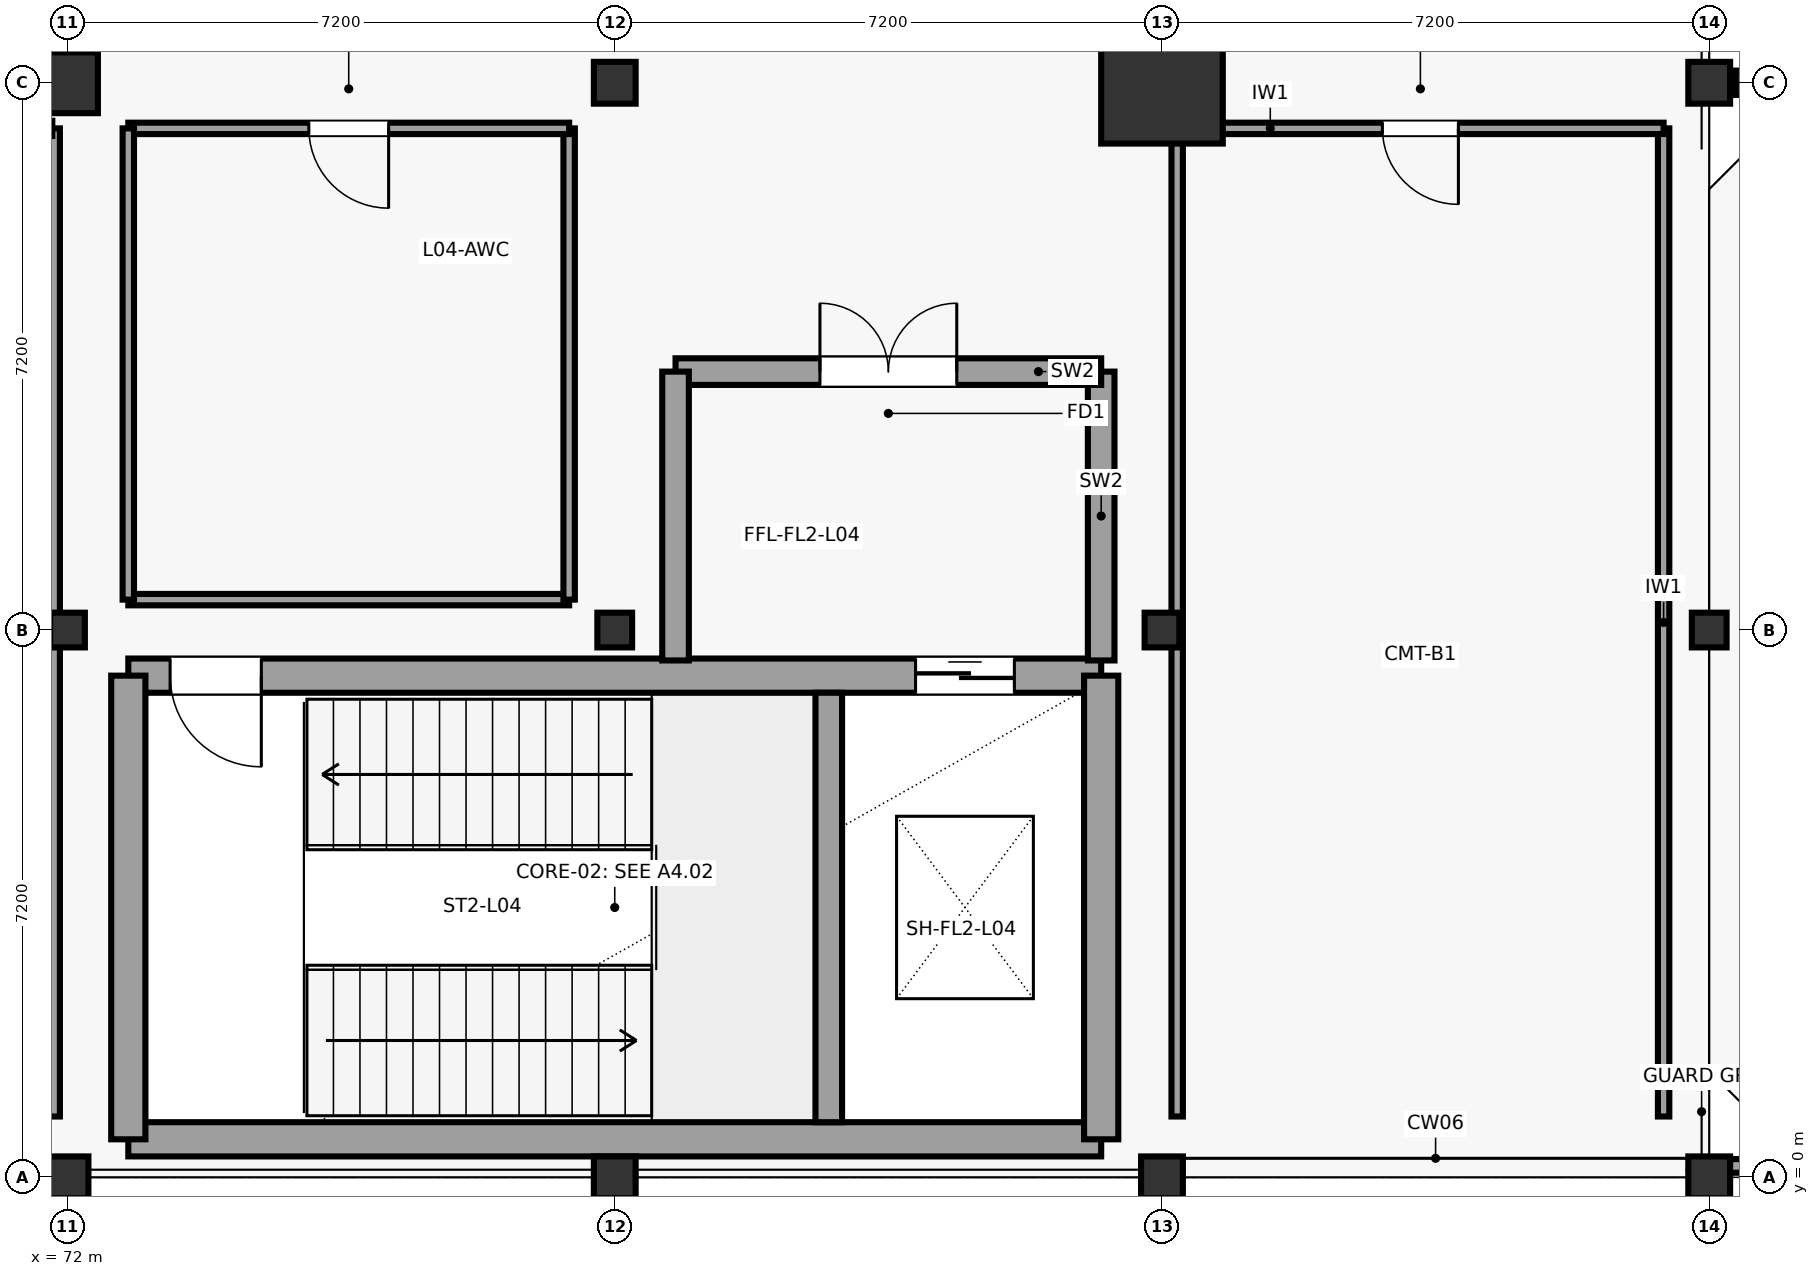
"""IFC4 building model, lengths in metres.
Left out: names, types, materials, properties, quantities, classifications, styles, units other than length and angle.
Written with IfcOpenShell. Run it as: python <this file> out.ifc"""

import sys

from ifc_helpers import new_model, si_unit, direction, frame, frame_2d, origin, origin_2d, place, context, subcontext, project, spatial, rectangle, circle, hollow_circle, extrude, element, fill, save


model = new_model("IFC4")
c1 = context("Model", 3, precision=1e-05, world=origin(), true_north=direction((0.0, 1.0)))
c2 = subcontext(c1, "Body", "Model", "MODEL_VIEW")
j1 = project(units=[si_unit("LENGTHUNIT", "METRE"), si_unit("PLANEANGLEUNIT", "RADIAN")], contexts=[c1])
p1 = place(None, origin())
s1 = spatial("IfcSite", under=j1, at=p1, CompositionType="ELEMENT")
p2 = place(p1, origin())
s2 = spatial("IfcBuilding", under=s1, at=p2, CompositionType="ELEMENT")
p3 = place(p2, frame((0.0, 0.0, 18.6)))
s3 = spatial("IfcBuildingStorey", under=s2, at=p3, CompositionType="ELEMENT", Elevation=18.6)
p4 = place(p3, frame((72.0, 0.0, 0.0), z_axis=(0.0, 0.0, 1.0), x_axis=(1.0, 0.0, 0.0)))
e1 = element("IfcColumn", 1, at=p4, inside=s3, PredefinedType="COLUMN", context=c2, shape_type="SweptSolid", body=[
    extrude(rectangle(XDim=0.55, YDim=0.55, at=origin_2d()), origin(), (0.0, 0.0, 1.0), 4.4),
])
p5 = place(p3, frame((72.0, 7.2, 0.0), z_axis=(0.0, 0.0, 1.0), x_axis=(1.0, 0.0, 0.0)))
e2 = element("IfcColumn", 2, at=p5, inside=s3, PredefinedType="COLUMN", context=c2, shape_type="SweptSolid", body=[
    extrude(hollow_circle(Radius=0.229, WallThickness=0.02, at=origin_2d()), origin(), (0.0, 0.0, 1.0), 4.4),
])
p6 = place(p3, frame((72.0, 14.4, 0.0), z_axis=(0.0, 0.0, 1.0), x_axis=(1.0, 0.0, 0.0)))
e3 = element("IfcColumn", 3, at=p6, inside=s3, PredefinedType="COLUMN", context=c2, shape_type="SweptSolid", body=[
    extrude(circle(Radius=0.4, at=origin_2d()), origin(), (0.0, 0.0, 1.0), 4.4),
])
p7 = place(p3, frame((79.2, 0.0, 0.0), z_axis=(0.0, 0.0, 1.0), x_axis=(1.0, 0.0, 0.0)))
e4 = element("IfcColumn", 4, at=p7, inside=s3, PredefinedType="COLUMN", context=c2, shape_type="SweptSolid", body=[
    extrude(rectangle(XDim=0.55, YDim=0.55, at=origin_2d()), origin(), (0.0, 0.0, 1.0), 4.4),
])
p8 = place(p3, frame((79.2, 7.2, 0.0), z_axis=(0.0, 0.0, 1.0), x_axis=(1.0, 0.0, 0.0)))
e5 = element("IfcColumn", 5, at=p8, inside=s3, PredefinedType="COLUMN", context=c2, shape_type="SweptSolid", body=[
    extrude(hollow_circle(Radius=0.229, WallThickness=0.02, at=origin_2d()), origin(), (0.0, 0.0, 1.0), 4.4),
])
for number, where, z_axis, x_axis in (
    (6, (79.2, 14.4, 0.0), (0.0, 0.0, 1.0), (1.0, 0.0, 0.0)),
    (7, (86.4, 0.0, 0.0), (0.0, 0.0, 1.0), (1.0, 0.0, 0.0)),
):
    element("IfcColumn", number, at=place(p3, frame(where, z_axis=z_axis, x_axis=x_axis)), inside=s3, PredefinedType="COLUMN", context=c2, shape_type="SweptSolid", body=[
        extrude(rectangle(XDim=0.55, YDim=0.55, at=origin_2d()), origin(), (0.0, 0.0, 1.0), 4.4),
    ])
p9 = place(p3, frame((86.4, 7.2, 0.0), z_axis=(0.0, 0.0, 1.0), x_axis=(1.0, 0.0, 0.0)))
e8 = element("IfcColumn", 8, at=p9, inside=s3, PredefinedType="COLUMN", context=c2, shape_type="SweptSolid", body=[
    extrude(hollow_circle(Radius=0.229, WallThickness=0.02, at=origin_2d()), origin(), (0.0, 0.0, 1.0), 4.4),
])
p10 = place(p3, frame((86.4, 14.4, 0.0), z_axis=(0.0, 0.0, 1.0), x_axis=(1.0, 0.0, 0.0)))
e9 = element("IfcColumn", 9, at=p10, inside=s3, PredefinedType="COLUMN", context=c2, shape_type="SweptSolid", body=[
    extrude(circle(Radius=0.8, at=origin_2d()), origin(), (0.0, 0.0, 1.0), 4.4),
])
p11 = place(p3, frame((93.6, 0.0, 0.0), z_axis=(0.0, 0.0, 1.0), x_axis=(1.0, 0.0, 0.0)))
e10 = element("IfcColumn", 10, at=p11, inside=s3, PredefinedType="COLUMN", context=c2, shape_type="SweptSolid", body=[
    extrude(rectangle(XDim=0.55, YDim=0.55, at=origin_2d()), origin(), (0.0, 0.0, 1.0), 4.4),
])
p12 = place(p3, frame((93.6, 7.2, 0.0), z_axis=(0.0, 0.0, 1.0), x_axis=(1.0, 0.0, 0.0)))
e11 = element("IfcColumn", 11, at=p12, inside=s3, PredefinedType="COLUMN", context=c2, shape_type="SweptSolid", body=[
    extrude(hollow_circle(Radius=0.229, WallThickness=0.02, at=origin_2d()), origin(), (0.0, 0.0, 1.0), 4.4),
])
p13 = place(p3, frame((93.6, 14.4, 0.0), z_axis=(0.0, 0.0, 1.0), x_axis=(1.0, 0.0, 0.0)))
e12 = element("IfcColumn", 12, at=p13, inside=s3, PredefinedType="COLUMN", context=c2, shape_type="SweptSolid", body=[
    extrude(rectangle(XDim=0.55, YDim=0.55, at=origin_2d()), origin(), (0.0, 0.0, 1.0), 4.4),
])
p14 = place(p3, frame((72.8, 0.5, 0.0), z_axis=(0.0, 0.0, 1.0), x_axis=(1.0, 0.0, 0.0)))
e13 = element("IfcWall", 13, at=p14, inside=s3, PredefinedType="SHEAR", context=c2, shape_type="SweptSolid", body=[
    extrude(rectangle(XDim=12.8, YDim=0.45, at=frame_2d((6.4, 0.0))), origin(), (0.0, 0.0, 1.0), 4.15),
])
p15 = place(p3, frame((72.8, 6.6, 0.0), z_axis=(0.0, 0.0, 1.0), x_axis=(1.0, 0.0, 0.0)))
e14 = element("IfcWall", 14, at=p15, inside=s3, PredefinedType="SHEAR", context=c2, shape_type="SweptSolid", body=[
    extrude(rectangle(XDim=12.8, YDim=0.45, at=frame_2d((6.4, 0.0))), origin(), (0.0, 0.0, 1.0), 4.15),
])
p16 = place(p15, frame((0.55, 0.0, 0.0)))
e15 = element("IfcOpeningElement", 15, at=p16, cuts=e14, PredefinedType="OPENING", context=c2, shape_type="SweptSolid", body=[
    extrude(rectangle(XDim=1.2, YDim=2.25, at=frame_2d((0.6, 1.125))), frame((0.0, 0.235, 0.0), z_axis=(0.0, -1.0, 0.0), x_axis=(1.0, 0.0, 0.0)), (0.0, 0.0, 1.0), 0.47),
])
p17 = place(p15, frame((10.358, 0.0, 0.0)))
e16 = element("IfcOpeningElement", 16, at=p17, cuts=e14, PredefinedType="OPENING", context=c2, shape_type="SweptSolid", body=[
    extrude(rectangle(XDim=1.3, YDim=2.25, at=frame_2d((0.65, 1.125))), frame((0.0, 0.235, 0.0), z_axis=(0.0, -1.0, 0.0), x_axis=(1.0, 0.0, 0.0)), (0.0, 0.0, 1.0), 0.47),
])
for number, where, z_axis, x_axis in (
    (17, (72.8, 0.5, 0.0), (0.0, 0.0, 1.0), (0.0, 1.0, 0.0)),
    (18, (85.6, 0.5, 0.0), (0.0, 0.0, 1.0), (0.0, 1.0, 0.0)),
):
    element("IfcWall", number, at=place(p3, frame(where, z_axis=z_axis, x_axis=x_axis)), inside=s3, PredefinedType="SHEAR", context=c2, shape_type="SweptSolid", body=[
        extrude(rectangle(XDim=6.1, YDim=0.45, at=frame_2d((3.05, 0.0))), origin(), (0.0, 0.0, 1.0), 4.15),
    ])
p18 = place(p3, frame((82.016, 0.725, 0.0), z_axis=(0.0, 0.0, 1.0), x_axis=(0.0, 1.0, 0.0)))
e19 = element("IfcWall", 19, at=p18, inside=s3, PredefinedType="SHEAR", context=c2, shape_type="SweptSolid", body=[
    extrude(rectangle(XDim=5.65, YDim=0.35, at=frame_2d((2.825, 0.0))), origin(), (0.0, 0.0, 1.0), 4.15),
])
p19 = place(p3, frame((93.95, 14.4, 0.0), z_axis=(0.0, 0.0, 1.0), x_axis=(1.0, 0.0, 0.0)))
e20 = element("IfcWall", 20, at=p19, inside=s3, PredefinedType="SOLIDWALL", context=c2, shape_type="SweptSolid", body=[
    extrude(rectangle(XDim=13.7, YDim=0.32, at=frame_2d((6.85, 0.0))), origin(), (0.0, 0.0, 1.0), 3.21),
])
p20 = place(p3, frame((93.75, 0.15, 0.0), z_axis=(0.0, 0.0, 1.0), x_axis=(1.0, 0.0, 0.0)))
e21 = element("IfcWall", 21, at=p20, inside=s3, PredefinedType="PARAPET", context=c2, shape_type="SweptSolid", body=[
    extrude(rectangle(XDim=28.5, YDim=0.18, at=frame_2d((14.25, 0.0))), origin(), (0.0, 0.0, 1.0), 1.15),
])
p21 = place(p3, frame((85.6, 6.8, 0.0), z_axis=(0.0, 0.0, 1.0), x_axis=(0.0, 1.0, 0.0)))
e22 = element("IfcWall", 22, at=p21, inside=s3, PredefinedType="SHEAR", context=c2, shape_type="SweptSolid", body=[
    extrude(rectangle(XDim=3.8, YDim=0.35, at=frame_2d((1.9, 0.0))), origin(), (0.0, 0.0, 1.0), 3.21),
])
p22 = place(p3, frame((85.6, 10.6, 0.0), z_axis=(0.0, 0.0, 1.0), x_axis=(-1.0, 0.0, 0.0)))
e23 = element("IfcWall", 23, at=p22, inside=s3, PredefinedType="SHEAR", context=c2, shape_type="SweptSolid", body=[
    extrude(rectangle(XDim=5.6, YDim=0.35, at=frame_2d((2.8, 0.0))), origin(), (0.0, 0.0, 1.0), 3.21),
])
p23 = place(p22, frame((1.9, 0.0, 0.0)))
e24 = element("IfcOpeningElement", 24, at=p23, cuts=e23, PredefinedType="OPENING", context=c2, shape_type="SweptSolid", body=[
    extrude(rectangle(XDim=1.8, YDim=2.3, at=frame_2d((0.9, 1.15))), frame((0.0, 0.185, 0.0), z_axis=(0.0, -1.0, 0.0), x_axis=(1.0, 0.0, 0.0)), (0.0, 0.0, 1.0), 0.37),
])
p24 = place(p3, frame((80.0, 10.6, 0.0), z_axis=(0.0, 0.0, 1.0), x_axis=(0.0, -1.0, 0.0)))
e25 = element("IfcWall", 25, at=p24, inside=s3, PredefinedType="SHEAR", context=c2, shape_type="SweptSolid", body=[
    extrude(rectangle(XDim=3.8, YDim=0.35, at=frame_2d((1.9, 0.0))), origin(), (0.0, 0.0, 1.0), 3.21),
])
p25 = place(p3, frame((71.8, 0.8, 0.0), z_axis=(0.0, 0.0, 1.0), x_axis=(0.0, 1.0, 0.0)))
e26 = element("IfcWall", 26, at=p25, inside=s3, PredefinedType="PARTITIONING", context=c2, shape_type="SweptSolid", body=[
    extrude(rectangle(XDim=13.0, YDim=0.2, at=frame_2d((6.5, 0.0))), origin(), (0.0, 0.0, 1.0), 3.21),
])
p26 = place(p3, frame((71.8, 13.8, 0.0), z_axis=(0.0, 0.0, 1.0), x_axis=(-1.0, 0.0, 0.0)))
e27 = element("IfcWall", 27, at=p26, inside=s3, PredefinedType="PARTITIONING", context=c2, shape_type="SweptSolid", body=[
    extrude(rectangle(XDim=13.8, YDim=0.2, at=frame_2d((6.9, 0.0))), origin(), (0.0, 0.0, 1.0), 3.21),
])
p27 = place(p26, frame((7.6, 0.0, 0.0)))
e28 = element("IfcOpeningElement", 28, at=p27, cuts=e27, PredefinedType="OPENING", context=c2, shape_type="SweptSolid", body=[
    extrude(rectangle(XDim=1.2, YDim=2.25, at=frame_2d((0.6, 1.125))), frame((0.0, 0.11, 0.0), z_axis=(0.0, -1.0, 0.0), x_axis=(1.0, 0.0, 0.0)), (0.0, 0.0, 1.0), 0.22),
])
p28 = place(p3, frame((93.0, 0.8, 0.0), z_axis=(0.0, 0.0, 1.0), x_axis=(0.0, 1.0, 0.0)))
e29 = element("IfcWall", 29, at=p28, inside=s3, PredefinedType="PARTITIONING", context=c2, shape_type="SweptSolid", body=[
    extrude(rectangle(XDim=13.0, YDim=0.15, at=frame_2d((6.5, 0.0))), origin(), (0.0, 0.0, 1.0), 3.21),
])
p29 = place(p3, frame((93.0, 13.8, 0.0), z_axis=(0.0, 0.0, 1.0), x_axis=(-1.0, 0.0, 0.0)))
e30 = element("IfcWall", 30, at=p29, inside=s3, PredefinedType="PARTITIONING", context=c2, shape_type="SweptSolid", body=[
    extrude(rectangle(XDim=6.4, YDim=0.15, at=frame_2d((3.2, 0.0))), origin(), (0.0, 0.0, 1.0), 3.21),
])
p30 = place(p29, frame((2.7, 0.0, 0.0)))
e31 = element("IfcOpeningElement", 31, at=p30, cuts=e30, PredefinedType="OPENING", context=c2, shape_type="SweptSolid", body=[
    extrude(rectangle(XDim=1.0, YDim=2.2, at=frame_2d((0.5, 1.1))), frame((0.0, 0.085, 0.0), z_axis=(0.0, -1.0, 0.0), x_axis=(1.0, 0.0, 0.0)), (0.0, 0.0, 1.0), 0.17),
])
p31 = place(p3, frame((86.6, 13.8, 0.0), z_axis=(0.0, 0.0, 1.0), x_axis=(0.0, -1.0, 0.0)))
e32 = element("IfcWall", 32, at=p31, inside=s3, PredefinedType="PARTITIONING", context=c2, shape_type="SweptSolid", body=[
    extrude(rectangle(XDim=13.0, YDim=0.15, at=frame_2d((6.5, 0.0))), origin(), (0.0, 0.0, 1.0), 3.21),
])
p32 = place(p3, frame((72.8, 7.6, 0.0), z_axis=(0.0, 0.0, 1.0), x_axis=(1.0, 0.0, 0.0)))
e33 = element("IfcWall", 33, at=p32, inside=s3, PredefinedType="PARTITIONING", context=c2, shape_type="SweptSolid", body=[
    extrude(rectangle(XDim=5.8, YDim=0.15, at=frame_2d((2.9, 0.0))), origin(), (0.0, 0.0, 1.0), 3.21),
])
p33 = place(p3, frame((78.6, 7.6, 0.0), z_axis=(0.0, 0.0, 1.0), x_axis=(0.0, 1.0, 0.0)))
e34 = element("IfcWall", 34, at=p33, inside=s3, PredefinedType="PARTITIONING", context=c2, shape_type="SweptSolid", body=[
    extrude(rectangle(XDim=6.2, YDim=0.15, at=frame_2d((3.1, 0.0))), origin(), (0.0, 0.0, 1.0), 3.21),
])
p34 = place(p3, frame((78.6, 13.8, 0.0), z_axis=(0.0, 0.0, 1.0), x_axis=(-1.0, 0.0, 0.0)))
e35 = element("IfcWall", 35, at=p34, inside=s3, PredefinedType="PARTITIONING", context=c2, shape_type="SweptSolid", body=[
    extrude(rectangle(XDim=5.8, YDim=0.15, at=frame_2d((2.9, 0.0))), origin(), (0.0, 0.0, 1.0), 3.21),
])
p35 = place(p34, frame((2.375, 0.0, 0.0)))
e36 = element("IfcOpeningElement", 36, at=p35, cuts=e35, PredefinedType="OPENING", context=c2, shape_type="SweptSolid", body=[
    extrude(rectangle(XDim=1.05, YDim=2.2, at=frame_2d((0.525, 1.1))), frame((0.0, 0.085, 0.0), z_axis=(0.0, -1.0, 0.0), x_axis=(1.0, 0.0, 0.0)), (0.0, 0.0, 1.0), 0.17),
])
p36 = place(p3, frame((72.8, 13.8, 0.0), z_axis=(0.0, 0.0, 1.0), x_axis=(0.0, -1.0, 0.0)))
e37 = element("IfcWall", 37, at=p36, inside=s3, PredefinedType="PARTITIONING", context=c2, shape_type="SweptSolid", body=[
    extrude(rectangle(XDim=6.2, YDim=0.15, at=frame_2d((3.1, 0.0))), origin(), (0.0, 0.0, 1.0), 3.21),
])
p37 = place(p16, frame((1.2, 0.0, 0.0), z_axis=(0.0, 0.0, 1.0), x_axis=(-1.0, 0.0, 0.0)))
e38 = element("IfcDoor", 38, at=p37, inside=s3, OperationType="SINGLE_SWING_RIGHT", PredefinedType="DOOR", context=c2, shape_type="SweptSolid", body=[
    extrude(rectangle(XDim=1.2, YDim=2.25, at=frame_2d((0.6, 1.125))), frame((0.0, 0.025, 0.0), z_axis=(0.0, -1.0, 0.0), x_axis=(1.0, 0.0, 0.0)), (0.0, 0.0, 1.0), 0.05),
])
fill(e15, e38)
p38 = place(p17, origin())
e39 = element("IfcDoor", 39, at=p38, inside=s3, OperationType="SLIDING_TO_RIGHT", PredefinedType="DOOR", context=c2, shape_type="SweptSolid", body=[
    extrude(rectangle(XDim=1.3, YDim=2.25, at=frame_2d((0.65, 1.125))), frame((0.0, 0.025, 0.0), z_axis=(0.0, -1.0, 0.0), x_axis=(1.0, 0.0, 0.0)), (0.0, 0.0, 1.0), 0.05),
])
fill(e16, e39)
p39 = place(p23, frame((1.8, 0.0, 0.0), z_axis=(0.0, 0.0, 1.0), x_axis=(-1.0, 0.0, 0.0)))
e40 = element("IfcDoor", 40, at=p39, inside=s3, OperationType="DOUBLE_DOOR_SINGLE_SWING", PredefinedType="DOOR", context=c2, shape_type="SweptSolid", body=[
    extrude(rectangle(XDim=1.8, YDim=2.3, at=frame_2d((0.9, 1.15))), frame((0.0, 0.025, 0.0), z_axis=(0.0, -1.0, 0.0), x_axis=(1.0, 0.0, 0.0)), (0.0, 0.0, 1.0), 0.05),
])
fill(e24, e40)
p40 = place(p30, origin())
e41 = element("IfcDoor", 41, at=p40, inside=s3, OperationType="SINGLE_SWING_LEFT", PredefinedType="DOOR", context=c2, shape_type="SweptSolid", body=[
    extrude(rectangle(XDim=1.0, YDim=2.2, at=frame_2d((0.5, 1.1))), frame((0.0, 0.025, 0.0), z_axis=(0.0, -1.0, 0.0), x_axis=(1.0, 0.0, 0.0)), (0.0, 0.0, 1.0), 0.05),
])
fill(e31, e41)
p41 = place(p35, origin())
e42 = element("IfcDoor", 42, at=p41, inside=s3, OperationType="SINGLE_SWING_LEFT", PredefinedType="DOOR", context=c2, shape_type="SweptSolid", body=[
    extrude(rectangle(XDim=1.05, YDim=2.2, at=frame_2d((0.525, 1.1))), frame((0.0, 0.025, 0.0), z_axis=(0.0, -1.0, 0.0), x_axis=(1.0, 0.0, 0.0)), (0.0, 0.0, 1.0), 0.05),
])
fill(e36, e42)
save(model, sys.argv[1])
